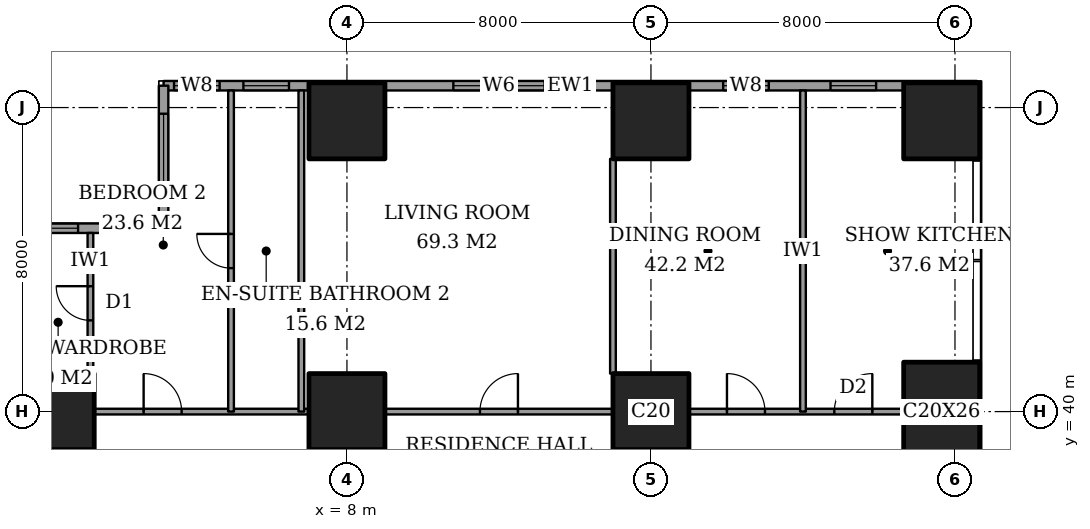
"""IFC4 building model, lengths in metres.
Left out: names, types, materials, properties, quantities, classifications, styles, units other than length and angle.
Written with IfcOpenShell. Run it as: python <this file> out.ifc"""

import sys

from ifc_helpers import new_model, si_unit, direction, frame, frame_2d, origin, origin_2d, place, context, subcontext, project, spatial, rectangle, extrude, element, fill, save


model = new_model("IFC4")
c1 = context("Model", 3, precision=1e-05, world=origin(), true_north=direction((0.0, 1.0)))
c2 = subcontext(c1, "Body", "Model", "MODEL_VIEW")
j1 = project(units=[si_unit("LENGTHUNIT", "METRE"), si_unit("PLANEANGLEUNIT", "RADIAN")], contexts=[c1])
p1 = place(None, origin())
s1 = spatial("IfcSite", under=j1, at=p1, CompositionType="ELEMENT")
p2 = place(p1, origin())
s2 = spatial("IfcBuilding", under=s1, at=p2, CompositionType="ELEMENT")
p3 = place(p2, frame((0.0, 0.0, 62.0)))
s3 = spatial("IfcBuildingStorey", under=s2, at=p3, CompositionType="ELEMENT", Elevation=62.0)
for number, where, z_axis, x_axis in (
    (1, (0.35, 40.0, 0.0), (0.0, 0.0, 1.0), (1.0, 0.0, 0.0)),
    (2, (8.0, 40.0, 0.0), (0.0, 0.0, 1.0), (1.0, 0.0, 0.0)),
    (3, (8.0, 47.65, 0.0), (0.0, 0.0, 1.0), (1.0, 0.0, 0.0)),
    (4, (16.0, 40.0, 0.0), (0.0, 0.0, 1.0), (1.0, 0.0, 0.0)),
    (5, (16.0, 47.65, 0.0), (0.0, 0.0, 1.0), (1.0, 0.0, 0.0)),
):
    element("IfcColumn", number, at=place(p3, frame(where, z_axis=z_axis, x_axis=x_axis)), inside=s3, PredefinedType="COLUMN", context=c2, shape_type="SweptSolid", body=[
        extrude(rectangle(XDim=2.0, YDim=2.0, at=origin_2d()), origin(), (0.0, 0.0, 1.0), 3.6),
    ])
p4 = place(p3, frame((23.65, 40.0, 0.0), z_axis=(0.0, 0.0, 1.0), x_axis=(1.0, 0.0, 0.0)))
e6 = element("IfcColumn", 6, at=p4, inside=s3, PredefinedType="COLUMN", context=c2, shape_type="SweptSolid", body=[
    extrude(rectangle(XDim=2.0, YDim=2.6, at=origin_2d()), origin(), (0.0, 0.0, 1.0), 3.6),
])
p5 = place(p3, frame((23.65, 47.65, 0.0), z_axis=(0.0, 0.0, 1.0), x_axis=(1.0, 0.0, 0.0)))
e7 = element("IfcColumn", 7, at=p5, inside=s3, PredefinedType="COLUMN", context=c2, shape_type="SweptSolid", body=[
    extrude(rectangle(XDim=2.0, YDim=2.0, at=origin_2d()), origin(), (0.0, 0.0, 1.0), 3.6),
])
p6 = place(p3, frame((24.575, 48.575, 0.0), z_axis=(0.0, 0.0, 1.0), x_axis=(-1.0, 0.0, 0.0)))
e8 = element("IfcWall", 8, at=p6, inside=s3, PredefinedType="SOLIDWALL", context=c2, shape_type="SweptSolid", body=[
    extrude(rectangle(XDim=21.4, YDim=0.25, at=frame_2d((10.7, 0.0))), origin(), (0.0, 0.0, 1.0), 3.6),
])
p7 = place(p6, frame((2.65, 0.0, 0.6)))
e9 = element("IfcOpeningElement", 9, at=p7, cuts=e8, PredefinedType="OPENING", context=c2, shape_type="SweptSolid", body=[
    extrude(rectangle(XDim=1.2, YDim=2.0, at=frame_2d((0.6, 1.0))), frame((0.0, 0.135, 0.0), z_axis=(0.0, -1.0, 0.0), x_axis=(1.0, 0.0, 0.0)), (0.0, 0.0, 1.0), 0.27),
])
p8 = place(p6, frame((5.475, 0.0, 0.6)))
e10 = element("IfcOpeningElement", 10, at=p8, cuts=e8, PredefinedType="OPENING", context=c2, shape_type="SweptSolid", body=[
    extrude(rectangle(XDim=1.2, YDim=2.0, at=frame_2d((0.6, 1.0))), frame((0.0, 0.135, 0.0), z_axis=(0.0, -1.0, 0.0), x_axis=(1.0, 0.0, 0.0)), (0.0, 0.0, 1.0), 0.27),
])
p9 = place(p6, frame((11.375, 0.0, 0.6)))
e11 = element("IfcOpeningElement", 11, at=p9, cuts=e8, PredefinedType="OPENING", context=c2, shape_type="SweptSolid", body=[
    extrude(rectangle(XDim=2.4, YDim=2.0, at=frame_2d((1.2, 1.0))), frame((0.0, 0.135, 0.0), z_axis=(0.0, -1.0, 0.0), x_axis=(1.0, 0.0, 0.0)), (0.0, 0.0, 1.0), 0.27),
])
p10 = place(p6, frame((18.1, 0.0, 0.6)))
e12 = element("IfcOpeningElement", 12, at=p10, cuts=e8, PredefinedType="OPENING", context=c2, shape_type="SweptSolid", body=[
    extrude(rectangle(XDim=1.2, YDim=2.0, at=frame_2d((0.6, 1.0))), frame((0.0, 0.135, 0.0), z_axis=(0.0, -1.0, 0.0), x_axis=(1.0, 0.0, 0.0)), (0.0, 0.0, 1.0), 0.27),
])
p11 = place(p6, frame((19.925, 0.0, 0.6)))
e13 = element("IfcOpeningElement", 13, at=p11, cuts=e8, PredefinedType="OPENING", context=c2, shape_type="SweptSolid", body=[
    extrude(rectangle(XDim=1.2, YDim=2.0, at=frame_2d((0.6, 1.0))), frame((0.0, 0.135, 0.0), z_axis=(0.0, -1.0, 0.0), x_axis=(1.0, 0.0, 0.0)), (0.0, 0.0, 1.0), 0.27),
])
p12 = place(p3, frame((3.175, 48.575, 0.0), z_axis=(0.0, 0.0, 1.0), x_axis=(0.0, -1.0, 0.0)))
e14 = element("IfcWall", 14, at=p12, inside=s3, PredefinedType="SOLIDWALL", context=c2, shape_type="SweptSolid", body=[
    extrude(rectangle(XDim=3.75, YDim=0.25, at=frame_2d((1.875, 0.0))), origin(), (0.0, 0.0, 1.0), 3.6),
])
p13 = place(p12, frame((0.738, 0.0, 0.6)))
e15 = element("IfcOpeningElement", 15, at=p13, cuts=e14, PredefinedType="OPENING", context=c2, shape_type="SweptSolid", body=[
    extrude(rectangle(XDim=2.4, YDim=2.0, at=frame_2d((1.2, 1.0))), frame((0.0, 0.135, 0.0), z_axis=(0.0, -1.0, 0.0), x_axis=(1.0, 0.0, 0.0)), (0.0, 0.0, 1.0), 0.27),
])
p14 = place(p3, frame((3.175, 44.825, 0.0), z_axis=(0.0, 0.0, 1.0), x_axis=(-1.0, 0.0, 0.0)))
e16 = element("IfcWall", 16, at=p14, inside=s3, PredefinedType="SOLIDWALL", context=c2, shape_type="SweptSolid", body=[
    extrude(rectangle(XDim=3.75, YDim=0.25, at=frame_2d((1.875, 0.0))), origin(), (0.0, 0.0, 1.0), 3.6),
])
p15 = place(p14, frame((0.363, 0.0, 0.6)))
e17 = element("IfcOpeningElement", 17, at=p15, cuts=e16, PredefinedType="OPENING", context=c2, shape_type="SweptSolid", body=[
    extrude(rectangle(XDim=1.2, YDim=2.0, at=frame_2d((0.6, 1.0))), frame((0.0, 0.135, 0.0), z_axis=(0.0, -1.0, 0.0), x_axis=(1.0, 0.0, 0.0)), (0.0, 0.0, 1.0), 0.27),
])
p16 = place(p14, frame((2.25, 0.0, 0.6)))
e18 = element("IfcOpeningElement", 18, at=p16, cuts=e16, PredefinedType="OPENING", context=c2, shape_type="SweptSolid", body=[
    extrude(rectangle(XDim=1.2, YDim=2.0, at=frame_2d((0.6, 1.0))), frame((0.0, 0.135, 0.0), z_axis=(0.0, -1.0, 0.0), x_axis=(1.0, 0.0, 0.0)), (0.0, 0.0, 1.0), 0.27),
])
p17 = place(p3, frame((1.35, 40.0, 0.0), z_axis=(0.0, 0.0, 1.0), x_axis=(1.0, 0.0, 0.0)))
e19 = element("IfcWall", 19, at=p17, inside=s3, PredefinedType="PARTITIONING", context=c2, shape_type="SweptSolid", body=[
    extrude(rectangle(XDim=5.65, YDim=0.15, at=frame_2d((2.825, 0.0))), origin(), (0.0, 0.0, 1.0), 3.35),
])
p18 = place(p17, frame((1.3, 0.0, 0.0)))
e20 = element("IfcOpeningElement", 20, at=p18, cuts=e19, PredefinedType="OPENING", context=c2, shape_type="SweptSolid", body=[
    extrude(rectangle(XDim=1.0, YDim=2.1, at=frame_2d((0.5, 1.05))), frame((0.0, 0.085, 0.0), z_axis=(0.0, -1.0, 0.0), x_axis=(1.0, 0.0, 0.0)), (0.0, 0.0, 1.0), 0.17),
])
p19 = place(p3, frame((9.0, 40.0, 0.0), z_axis=(0.0, 0.0, 1.0), x_axis=(1.0, 0.0, 0.0)))
e21 = element("IfcWall", 21, at=p19, inside=s3, PredefinedType="PARTITIONING", context=c2, shape_type="SweptSolid", body=[
    extrude(rectangle(XDim=6.0, YDim=0.15, at=frame_2d((3.0, 0.0))), origin(), (0.0, 0.0, 1.0), 3.35),
])
p20 = place(p19, frame((2.5, 0.0, 0.0)))
e22 = element("IfcOpeningElement", 22, at=p20, cuts=e21, PredefinedType="OPENING", context=c2, shape_type="SweptSolid", body=[
    extrude(rectangle(XDim=1.0, YDim=2.1, at=frame_2d((0.5, 1.05))), frame((0.0, 0.085, 0.0), z_axis=(0.0, -1.0, 0.0), x_axis=(1.0, 0.0, 0.0)), (0.0, 0.0, 1.0), 0.17),
])
p21 = place(p3, frame((17.0, 40.0, 0.0), z_axis=(0.0, 0.0, 1.0), x_axis=(1.0, 0.0, 0.0)))
e23 = element("IfcWall", 23, at=p21, inside=s3, PredefinedType="PARTITIONING", context=c2, shape_type="SweptSolid", body=[
    extrude(rectangle(XDim=5.65, YDim=0.15, at=frame_2d((2.825, 0.0))), origin(), (0.0, 0.0, 1.0), 3.35),
])
p22 = place(p21, frame((1.0, 0.0, 0.0)))
e24 = element("IfcOpeningElement", 24, at=p22, cuts=e23, PredefinedType="OPENING", context=c2, shape_type="SweptSolid", body=[
    extrude(rectangle(XDim=1.0, YDim=2.1, at=frame_2d((0.5, 1.05))), frame((0.0, 0.085, 0.0), z_axis=(0.0, -1.0, 0.0), x_axis=(1.0, 0.0, 0.0)), (0.0, 0.0, 1.0), 0.17),
])
p23 = place(p21, frame((3.825, 0.0, 0.0)))
e25 = element("IfcOpeningElement", 25, at=p23, cuts=e23, PredefinedType="OPENING", context=c2, shape_type="SweptSolid", body=[
    extrude(rectangle(XDim=1.0, YDim=2.1, at=frame_2d((0.5, 1.05))), frame((0.0, 0.085, 0.0), z_axis=(0.0, -1.0, 0.0), x_axis=(1.0, 0.0, 0.0)), (0.0, 0.0, 1.0), 0.17),
])
p24 = place(p3, frame((1.25, 41.0, 0.0), z_axis=(0.0, 0.0, 1.0), x_axis=(0.0, 1.0, 0.0)))
e26 = element("IfcWall", 26, at=p24, inside=s3, PredefinedType="PARTITIONING", context=c2, shape_type="SweptSolid", body=[
    extrude(rectangle(XDim=3.7, YDim=0.15, at=frame_2d((1.85, 0.0))), origin(), (0.0, 0.0, 1.0), 3.35),
])
p25 = place(p24, frame((1.4, 0.0, 0.0)))
e27 = element("IfcOpeningElement", 27, at=p25, cuts=e26, PredefinedType="OPENING", context=c2, shape_type="SweptSolid", body=[
    extrude(rectangle(XDim=0.9, YDim=2.1, at=frame_2d((0.45, 1.05))), frame((0.0, 0.085, 0.0), z_axis=(0.0, -1.0, 0.0), x_axis=(1.0, 0.0, 0.0)), (0.0, 0.0, 1.0), 0.17),
])
p26 = place(p3, frame((4.95, 40.0, 0.0), z_axis=(0.0, 0.0, 1.0), x_axis=(0.0, 1.0, 0.0)))
e28 = element("IfcWall", 28, at=p26, inside=s3, PredefinedType="PARTITIONING", context=c2, shape_type="SweptSolid", body=[
    extrude(rectangle(XDim=8.45, YDim=0.15, at=frame_2d((4.225, 0.0))), origin(), (0.0, 0.0, 1.0), 3.35),
])
p27 = place(p26, frame((3.775, 0.0, 0.0)))
e29 = element("IfcOpeningElement", 29, at=p27, cuts=e28, PredefinedType="OPENING", context=c2, shape_type="SweptSolid", body=[
    extrude(rectangle(XDim=0.9, YDim=2.1, at=frame_2d((0.45, 1.05))), frame((0.0, 0.085, 0.0), z_axis=(0.0, -1.0, 0.0), x_axis=(1.0, 0.0, 0.0)), (0.0, 0.0, 1.0), 0.17),
])
p28 = place(p3, frame((6.8, 40.0, 0.0), z_axis=(0.0, 0.0, 1.0), x_axis=(0.0, 1.0, 0.0)))
e30 = element("IfcWall", 30, at=p28, inside=s3, PredefinedType="PARTITIONING", context=c2, shape_type="SweptSolid", body=[
    extrude(rectangle(XDim=8.45, YDim=0.15, at=frame_2d((4.225, 0.0))), origin(), (0.0, 0.0, 1.0), 3.35),
])
p29 = place(p3, frame((15.0, 41.0, 0.0), z_axis=(0.0, 0.0, 1.0), x_axis=(0.0, 1.0, 0.0)))
e31 = element("IfcWall", 31, at=p29, inside=s3, PredefinedType="PARTITIONING", context=c2, shape_type="SweptSolid", body=[
    extrude(rectangle(XDim=5.65, YDim=0.15, at=frame_2d((2.825, 0.0))), origin(), (0.0, 0.0, 1.0), 3.35),
])
p30 = place(p3, frame((20.0, 40.0, 0.0), z_axis=(0.0, 0.0, 1.0), x_axis=(0.0, 1.0, 0.0)))
e32 = element("IfcWall", 32, at=p30, inside=s3, PredefinedType="PARTITIONING", context=c2, shape_type="SweptSolid", body=[
    extrude(rectangle(XDim=8.45, YDim=0.15, at=frame_2d((4.225, 0.0))), origin(), (0.0, 0.0, 1.0), 3.35),
])
p31 = place(p7, origin())
e33 = element("IfcWindow", 33, at=p31, inside=s3, PartitioningType="SINGLE_PANEL", PredefinedType="WINDOW", context=c2, shape_type="SweptSolid", body=[
    extrude(rectangle(XDim=1.2, YDim=2.0, at=frame_2d((0.6, 1.0))), frame((0.0, 0.03, 0.0), z_axis=(0.0, -1.0, 0.0), x_axis=(1.0, 0.0, 0.0)), (0.0, 0.0, 1.0), 0.06),
])
fill(e9, e33)
p32 = place(p8, origin())
e34 = element("IfcWindow", 34, at=p32, inside=s3, PartitioningType="SINGLE_PANEL", PredefinedType="WINDOW", context=c2, shape_type="SweptSolid", body=[
    extrude(rectangle(XDim=1.2, YDim=2.0, at=frame_2d((0.6, 1.0))), frame((0.0, 0.03, 0.0), z_axis=(0.0, -1.0, 0.0), x_axis=(1.0, 0.0, 0.0)), (0.0, 0.0, 1.0), 0.06),
])
fill(e10, e34)
p33 = place(p9, origin())
e35 = element("IfcWindow", 35, at=p33, inside=s3, PartitioningType="SINGLE_PANEL", PredefinedType="WINDOW", context=c2, shape_type="SweptSolid", body=[
    extrude(rectangle(XDim=2.4, YDim=2.0, at=frame_2d((1.2, 1.0))), frame((0.0, 0.03, 0.0), z_axis=(0.0, -1.0, 0.0), x_axis=(1.0, 0.0, 0.0)), (0.0, 0.0, 1.0), 0.06),
])
fill(e11, e35)
p34 = place(p10, origin())
e36 = element("IfcWindow", 36, at=p34, inside=s3, PartitioningType="SINGLE_PANEL", PredefinedType="WINDOW", context=c2, shape_type="SweptSolid", body=[
    extrude(rectangle(XDim=1.2, YDim=2.0, at=frame_2d((0.6, 1.0))), frame((0.0, 0.03, 0.0), z_axis=(0.0, -1.0, 0.0), x_axis=(1.0, 0.0, 0.0)), (0.0, 0.0, 1.0), 0.06),
])
fill(e12, e36)
p35 = place(p11, origin())
e37 = element("IfcWindow", 37, at=p35, inside=s3, PartitioningType="SINGLE_PANEL", PredefinedType="WINDOW", context=c2, shape_type="SweptSolid", body=[
    extrude(rectangle(XDim=1.2, YDim=2.0, at=frame_2d((0.6, 1.0))), frame((0.0, 0.03, 0.0), z_axis=(0.0, -1.0, 0.0), x_axis=(1.0, 0.0, 0.0)), (0.0, 0.0, 1.0), 0.06),
])
fill(e13, e37)
p36 = place(p13, origin())
e38 = element("IfcWindow", 38, at=p36, inside=s3, PartitioningType="SINGLE_PANEL", PredefinedType="WINDOW", context=c2, shape_type="SweptSolid", body=[
    extrude(rectangle(XDim=2.4, YDim=2.0, at=frame_2d((1.2, 1.0))), frame((0.0, 0.03, 0.0), z_axis=(0.0, -1.0, 0.0), x_axis=(1.0, 0.0, 0.0)), (0.0, 0.0, 1.0), 0.06),
])
fill(e15, e38)
p37 = place(p15, origin())
e39 = element("IfcWindow", 39, at=p37, inside=s3, PartitioningType="SINGLE_PANEL", PredefinedType="WINDOW", context=c2, shape_type="SweptSolid", body=[
    extrude(rectangle(XDim=1.2, YDim=2.0, at=frame_2d((0.6, 1.0))), frame((0.0, 0.03, 0.0), z_axis=(0.0, -1.0, 0.0), x_axis=(1.0, 0.0, 0.0)), (0.0, 0.0, 1.0), 0.06),
])
fill(e17, e39)
p38 = place(p16, origin())
e40 = element("IfcWindow", 40, at=p38, inside=s3, PartitioningType="SINGLE_PANEL", PredefinedType="WINDOW", context=c2, shape_type="SweptSolid", body=[
    extrude(rectangle(XDim=1.2, YDim=2.0, at=frame_2d((0.6, 1.0))), frame((0.0, 0.03, 0.0), z_axis=(0.0, -1.0, 0.0), x_axis=(1.0, 0.0, 0.0)), (0.0, 0.0, 1.0), 0.06),
])
fill(e18, e40)
p39 = place(p25, origin())
e41 = element("IfcDoor", 41, at=p39, inside=s3, OperationType="SINGLE_SWING_LEFT", PredefinedType="DOOR", context=c2, shape_type="SweptSolid", body=[
    extrude(rectangle(XDim=0.9, YDim=2.1, at=frame_2d((0.45, 1.05))), frame((0.0, 0.025, 0.0), z_axis=(0.0, -1.0, 0.0), x_axis=(1.0, 0.0, 0.0)), (0.0, 0.0, 1.0), 0.05),
])
fill(e27, e41)
p40 = place(p18, origin())
e42 = element("IfcDoor", 42, at=p40, inside=s3, OperationType="SINGLE_SWING_RIGHT", PredefinedType="DOOR", context=c2, shape_type="SweptSolid", body=[
    extrude(rectangle(XDim=1.0, YDim=2.1, at=frame_2d((0.5, 1.05))), frame((0.0, 0.025, 0.0), z_axis=(0.0, -1.0, 0.0), x_axis=(1.0, 0.0, 0.0)), (0.0, 0.0, 1.0), 0.05),
])
fill(e20, e42)
p41 = place(p27, origin())
e43 = element("IfcDoor", 43, at=p41, inside=s3, OperationType="SINGLE_SWING_LEFT", PredefinedType="DOOR", context=c2, shape_type="SweptSolid", body=[
    extrude(rectangle(XDim=0.9, YDim=2.1, at=frame_2d((0.45, 1.05))), frame((0.0, 0.025, 0.0), z_axis=(0.0, -1.0, 0.0), x_axis=(1.0, 0.0, 0.0)), (0.0, 0.0, 1.0), 0.05),
])
fill(e29, e43)
p42 = place(p20, origin())
e44 = element("IfcDoor", 44, at=p42, inside=s3, OperationType="SINGLE_SWING_LEFT", PredefinedType="DOOR", context=c2, shape_type="SweptSolid", body=[
    extrude(rectangle(XDim=1.0, YDim=2.1, at=frame_2d((0.5, 1.05))), frame((0.0, 0.025, 0.0), z_axis=(0.0, -1.0, 0.0), x_axis=(1.0, 0.0, 0.0)), (0.0, 0.0, 1.0), 0.05),
])
fill(e22, e44)
p43 = place(p22, origin())
e45 = element("IfcDoor", 45, at=p43, inside=s3, OperationType="SINGLE_SWING_RIGHT", PredefinedType="DOOR", context=c2, shape_type="SweptSolid", body=[
    extrude(rectangle(XDim=1.0, YDim=2.1, at=frame_2d((0.5, 1.05))), frame((0.0, 0.025, 0.0), z_axis=(0.0, -1.0, 0.0), x_axis=(1.0, 0.0, 0.0)), (0.0, 0.0, 1.0), 0.05),
])
fill(e24, e45)
p44 = place(p23, origin())
e46 = element("IfcDoor", 46, at=p44, inside=s3, OperationType="SINGLE_SWING_LEFT", PredefinedType="DOOR", context=c2, shape_type="SweptSolid", body=[
    extrude(rectangle(XDim=1.0, YDim=2.1, at=frame_2d((0.5, 1.05))), frame((0.0, 0.025, 0.0), z_axis=(0.0, -1.0, 0.0), x_axis=(1.0, 0.0, 0.0)), (0.0, 0.0, 1.0), 0.05),
])
fill(e25, e46)
save(model, sys.argv[1])
